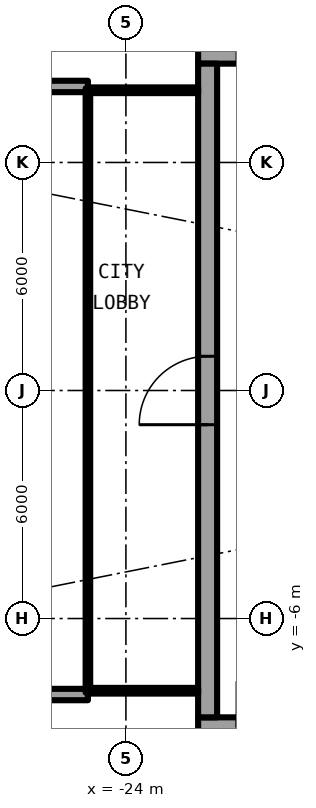
"""IFC4 building model, lengths in metres.
Left out: names, types, materials, properties, quantities, classifications, styles, units other than length and angle.
Written with IfcOpenShell. Run it as: python <this file> out.ifc"""

import sys

from ifc_helpers import new_model, si_unit, direction, frame, frame_2d, origin, place, context, subcontext, project, spatial, rectangle, extrude, element, fill, save


model = new_model("IFC4")
c1 = context("Model", 3, precision=1e-05, world=origin(), true_north=direction((0.0, 1.0)))
c2 = subcontext(c1, "Body", "Model", "MODEL_VIEW")
j1 = project(units=[si_unit("LENGTHUNIT", "METRE"), si_unit("PLANEANGLEUNIT", "RADIAN")], contexts=[c1])
p1 = place(None, origin())
s1 = spatial("IfcSite", under=j1, at=p1, CompositionType="ELEMENT")
p2 = place(p1, origin())
s2 = spatial("IfcBuilding", under=s1, at=p2, CompositionType="ELEMENT")
p3 = place(p2, frame((0.0, 0.0, 173.8)))
s3 = spatial("IfcBuildingStorey", under=s2, at=p3, CompositionType="ELEMENT", Elevation=173.8)
for number, where, z_axis, x_axis in (
    (1, (-25.0, 8.0, 0.0), (0.0, 0.0, 1.0), (-1.0, 0.0, 0.0)),
    (2, (-25.0, -8.0, 0.0), (0.0, 0.0, 1.0), (-1.0, 0.0, 0.0)),
):
    element("IfcWall", number, at=place(p3, frame(where, z_axis=z_axis, x_axis=x_axis)), inside=s3, PredefinedType="SOLIDWALL", context=c2, shape_type="SweptSolid", body=[
        extrude(rectangle(XDim=2.667, YDim=0.3, at=frame_2d((1.333, 0.0))), origin(), (0.0, 0.0, 1.0), 2.7),
    ])
p4 = place(p3, frame((-22.1, -8.85, 0.0), z_axis=(0.0, 0.0, 1.0), x_axis=(1.0, 0.0, 0.0)))
e3 = element("IfcWall", 3, at=p4, inside=s3, PredefinedType="SHEAR", context=c2, shape_type="SweptSolid", body=[
    extrude(rectangle(XDim=13.6, YDim=0.5, at=frame_2d((6.8, 0.0))), origin(), (0.0, 0.0, 1.0), 3.05),
])
p5 = place(p4, frame((1.025, 0.0, 0.0)))
e4 = element("IfcOpeningElement", 4, at=p5, cuts=e3, PredefinedType="OPENING", context=c2, shape_type="SweptSolid", body=[
    extrude(rectangle(XDim=1.2, YDim=2.3, at=frame_2d((0.6, 1.15))), frame((0.0, 0.26, 0.0), z_axis=(0.0, -1.0, 0.0), x_axis=(1.0, 0.0, 0.0)), (0.0, 0.0, 1.0), 0.52),
])
p6 = place(p3, frame((-8.5, 8.85, 0.0), z_axis=(0.0, 0.0, 1.0), x_axis=(-1.0, 0.0, 0.0)))
e5 = element("IfcWall", 5, at=p6, inside=s3, PredefinedType="SHEAR", context=c2, shape_type="SweptSolid", body=[
    extrude(rectangle(XDim=13.6, YDim=0.5, at=frame_2d((6.8, 0.0))), origin(), (0.0, 0.0, 1.0), 3.05),
])
p7 = place(p6, frame((11.375, 0.0, 0.0)))
e6 = element("IfcOpeningElement", 6, at=p7, cuts=e5, PredefinedType="OPENING", context=c2, shape_type="SweptSolid", body=[
    extrude(rectangle(XDim=1.2, YDim=2.3, at=frame_2d((0.6, 1.15))), frame((0.0, 0.26, 0.0), z_axis=(0.0, -1.0, 0.0), x_axis=(1.0, 0.0, 0.0)), (0.0, 0.0, 1.0), 0.52),
])
p8 = place(p3, frame((-21.85, -8.6, 0.0), z_axis=(0.0, 0.0, 1.0), x_axis=(0.0, 1.0, 0.0)))
e7 = element("IfcWall", 7, at=p8, inside=s3, PredefinedType="SHEAR", context=c2, shape_type="SweptSolid", body=[
    extrude(rectangle(XDim=17.2, YDim=0.5, at=frame_2d((8.6, 0.0))), origin(), (0.0, 0.0, 1.0), 3.05),
])
p9 = place(p8, frame((7.7, 0.0, 0.0)))
e8 = element("IfcOpeningElement", 8, at=p9, cuts=e7, PredefinedType="OPENING", context=c2, shape_type="SweptSolid", body=[
    extrude(rectangle(XDim=1.8, YDim=2.3, at=frame_2d((0.9, 1.15))), frame((0.0, 0.26, 0.0), z_axis=(0.0, -1.0, 0.0), x_axis=(1.0, 0.0, 0.0)), (0.0, 0.0, 1.0), 0.52),
])
for number, where, z_axis, x_axis in (
    (9, (-22.1, 7.9, 0.0), (0.0, 0.0, 1.0), (-1.0, 0.0, 0.0)),
    (10, (-22.1, -7.9, 0.0), (0.0, 0.0, 1.0), (-1.0, 0.0, 0.0)),
):
    element("IfcWall", number, at=place(p3, frame(where, z_axis=z_axis, x_axis=x_axis)), inside=s3, PredefinedType="PARTITIONING", context=c2, shape_type="SweptSolid", body=[
        extrude(rectangle(XDim=2.84, YDim=0.15, at=frame_2d((1.42, 0.0))), origin(), (0.0, 0.0, 1.0), 2.7),
    ])
p10 = place(p3, frame((-25.0, 7.95, 0.0), z_axis=(0.0, 0.0, 1.0), x_axis=(0.0, -1.0, 0.0)))
e11 = element("IfcWall", 11, at=p10, inside=s3, PredefinedType="PARTITIONING", context=c2, shape_type="SweptSolid", body=[
    extrude(rectangle(XDim=15.9, YDim=0.12, at=frame_2d((7.95, 0.0))), origin(), (0.0, 0.0, 1.0), 2.7),
])
p11 = place(p10, frame((0.95, 0.0, 0.1)))
e12 = element("IfcOpeningElement", 12, at=p11, cuts=e11, PredefinedType="OPENING", context=c2, shape_type="SweptSolid", body=[
    extrude(rectangle(XDim=14.0, YDim=2.35, at=frame_2d((7.0, 1.175))), frame((0.0, 0.07, 0.0), z_axis=(0.0, -1.0, 0.0), x_axis=(1.0, 0.0, 0.0)), (0.0, 0.0, 1.0), 0.14),
])
p12 = place(p9, origin())
e13 = element("IfcDoor", 13, at=p12, inside=s3, OperationType="SINGLE_SWING_LEFT", PredefinedType="DOOR", context=c2, shape_type="SweptSolid", body=[
    extrude(rectangle(XDim=1.8, YDim=2.3, at=frame_2d((0.9, 1.15))), frame((0.0, 0.025, 0.0), z_axis=(0.0, -1.0, 0.0), x_axis=(1.0, 0.0, 0.0)), (0.0, 0.0, 1.0), 0.05),
])
fill(e8, e13)
p13 = place(p11, origin())
e14 = element("IfcWindow", 14, at=p13, inside=s3, PartitioningType="SINGLE_PANEL", PredefinedType="WINDOW", context=c2, shape_type="SweptSolid", body=[
    extrude(rectangle(XDim=14.0, YDim=2.35, at=frame_2d((7.0, 1.175))), frame((0.0, 0.03, 0.0), z_axis=(0.0, -1.0, 0.0), x_axis=(1.0, 0.0, 0.0)), (0.0, 0.0, 1.0), 0.06),
])
fill(e12, e14)
save(model, sys.argv[1])
